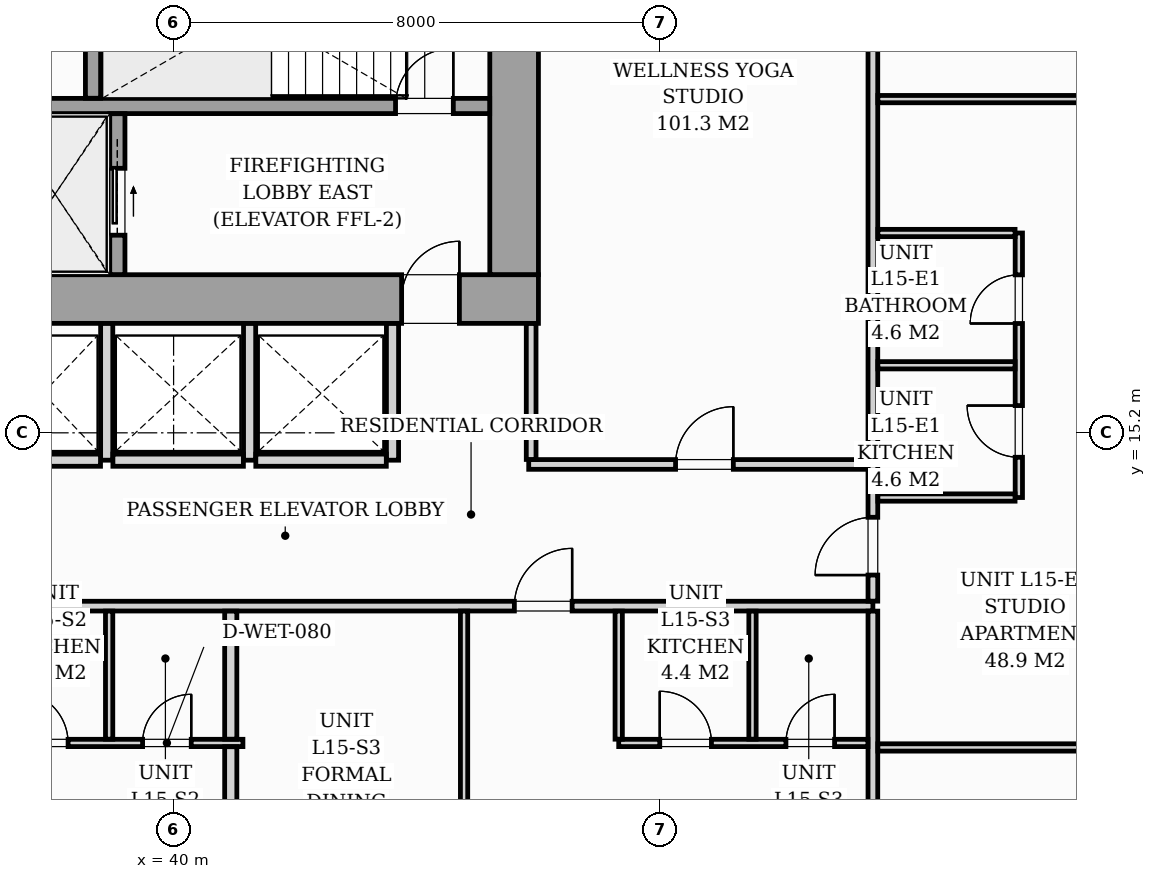
"""IFC4 building model, lengths in metres.
Left out: names, types, materials, properties, quantities, classifications, styles, units other than length and angle.
Written with IfcOpenShell. Run it as: python <this file> out.ifc"""

import sys

from ifc_helpers import new_model, si_unit, direction, frame, frame_2d, origin, origin_2d, place, context, subcontext, project, spatial, rectangle, i_section, extrude, source, transform, mapped, element, fill, save


model = new_model("IFC4")
c1 = context("Model", 3, precision=1e-05, world=origin(), true_north=direction((0.0, 1.0)))
c2 = subcontext(c1, "Body", "Model", "MODEL_VIEW")
j1 = project(units=[si_unit("LENGTHUNIT", "METRE"), si_unit("PLANEANGLEUNIT", "RADIAN")], contexts=[c1])
p1 = place(None, origin())
s1 = spatial("IfcSite", under=j1, at=p1, CompositionType="ELEMENT")
p2 = place(p1, origin())
s2 = spatial("IfcBuilding", under=s1, at=p2, CompositionType="ELEMENT")
p3 = place(p2, frame((0.0, 0.0, 55.0)))
s3 = spatial("IfcBuildingStorey", under=s2, at=p3, CompositionType="ELEMENT", Elevation=55.0)
m1 = source(origin(), c2, "Body", "SweptSolid", [
    extrude(i_section(OverallWidth=0.437, OverallDepth=0.514, WebThickness=0.061, FlangeThickness=0.097, FilletRadius=0.018, at=origin_2d()), origin(), (0.0, 0.0, 1.0), 3.196),
])
for number, where, z_axis, x_axis in (
    (1, (38.88, 17.4, 0.002), (0.0, 0.0, 1.0), (1.0, 0.0, 0.0)),
    (2, (45.6, 17.4, 0.002), (0.0, 0.0, 1.0), (1.0, 0.0, 0.0)),
):
    element("IfcColumn", number, at=place(p3, frame(where, z_axis=z_axis, x_axis=x_axis)), inside=s3, PredefinedType="PILASTER", context=c2, shape_type="MappedRepresentation", body=[
        mapped(m1, transform((0.0, 0.0, 0.0), scale=1.0)),
    ])
p4 = place(p3, frame((26.0, 17.4, 0.0), z_axis=(0.0, 0.0, 1.0), x_axis=(1.0, 0.0, 0.0)))
e3 = element("IfcWall", 3, at=p4, inside=s3, PredefinedType="SHEAR", context=c2, shape_type="SweptSolid", body=[
    extrude(rectangle(XDim=20.0, YDim=0.8, at=frame_2d((10.0, 0.0))), origin(), (0.0, 0.0, 1.0), 3.2),
])
p5 = place(p4, frame((1.15, 0.0, 0.0)))
e4 = element("IfcOpeningElement", 4, at=p5, cuts=e3, PredefinedType="OPENING", context=c2, shape_type="SweptSolid", body=[
    extrude(rectangle(XDim=0.95, YDim=2.06, at=frame_2d((0.475, 1.03))), frame((0.0, 0.41, 0.0), z_axis=(0.0, -1.0, 0.0), x_axis=(1.0, 0.0, 0.0)), (0.0, 0.0, 1.0), 0.82),
])
p6 = place(p4, frame((9.58, 0.0, 0.0)))
e5 = element("IfcOpeningElement", 5, at=p6, cuts=e3, PredefinedType="OPENING", context=c2, shape_type="SweptSolid", body=[
    extrude(rectangle(XDim=0.85, YDim=2.0, at=frame_2d((0.425, 1.0))), frame((0.0, 0.41, 0.0), z_axis=(0.0, -1.0, 0.0), x_axis=(1.0, 0.0, 0.0)), (0.0, 0.0, 1.0), 0.82),
])
p7 = place(p4, frame((17.75, 0.0, 0.0)))
e6 = element("IfcOpeningElement", 6, at=p7, cuts=e3, PredefinedType="OPENING", context=c2, shape_type="SweptSolid", body=[
    extrude(rectangle(XDim=0.95, YDim=2.06, at=frame_2d((0.475, 1.03))), frame((0.0, 0.41, 0.0), z_axis=(0.0, -1.0, 0.0), x_axis=(1.0, 0.0, 0.0)), (0.0, 0.0, 1.0), 0.82),
])
p8 = place(p3, frame((45.6, 17.802, 0.0), z_axis=(0.0, 0.0, 1.0), x_axis=(0.0, 1.0, 0.0)))
e7 = element("IfcWall", 7, at=p8, inside=s3, PredefinedType="SHEAR", context=c2, shape_type="SweptSolid", body=[
    extrude(rectangle(XDim=5.796, YDim=0.8, at=frame_2d((2.898, 0.0))), origin(), (0.0, 0.0, 1.0), 3.2),
])
p9 = place(p3, frame((37.05, 20.575, 0.0), z_axis=(0.0, 0.0, 1.0), x_axis=(1.0, 0.0, 0.0)))
e8 = element("IfcWall", 8, at=p9, inside=s3, PredefinedType="SOLIDWALL", context=c2, shape_type="SweptSolid", body=[
    extrude(rectangle(XDim=8.148, YDim=0.25, at=frame_2d((4.074, 0.0))), origin(), (0.0, 0.0, 1.0), 3.2),
])
p10 = place(p9, frame((6.6, 0.0, 0.0)))
e9 = element("IfcOpeningElement", 9, at=p10, cuts=e8, PredefinedType="OPENING", context=c2, shape_type="SweptSolid", body=[
    extrude(rectangle(XDim=0.95, YDim=2.06, at=frame_2d((0.475, 1.03))), frame((0.0, 0.135, 0.0), z_axis=(0.0, -1.0, 0.0), x_axis=(1.0, 0.0, 0.0)), (0.0, 0.0, 1.0), 0.27),
])
p11 = place(p3, frame((38.675, 20.702, 0.0), z_axis=(0.0, 0.0, 1.0), x_axis=(0.0, 1.0, 0.0)))
e10 = element("IfcWall", 10, at=p11, inside=s3, PredefinedType="SOLIDWALL", context=c2, shape_type="SweptSolid", body=[
    extrude(rectangle(XDim=2.896, YDim=0.25, at=frame_2d((1.448, 0.0))), origin(), (0.0, 0.0, 1.0), 3.2),
])
p12 = place(p3, frame((39.075, 17.802, 0.0), z_axis=(0.0, 0.0, 1.0), x_axis=(0.0, 1.0, 0.0)))
e11 = element("IfcWall", 11, at=p12, inside=s3, PredefinedType="SOLIDWALL", context=c2, shape_type="SweptSolid", body=[
    extrude(rectangle(XDim=2.646, YDim=0.25, at=frame_2d((1.323, 0.0))), origin(), (0.0, 0.0, 1.0), 3.2),
])
p13 = place(p12, frame((0.648, 0.0, 0.0)))
e12 = element("IfcOpeningElement", 12, at=p13, cuts=e11, PredefinedType="OPENING", context=c2, shape_type="SweptSolid", body=[
    extrude(rectangle(XDim=1.1, YDim=2.08, at=frame_2d((0.55, 1.04))), frame((0.0, 0.135, 0.0), z_axis=(0.0, -1.0, 0.0), x_axis=(1.0, 0.0, 0.0)), (0.0, 0.0, 1.0), 0.27),
])
p14 = place(p3, frame((38.9, 14.75, 0.0), z_axis=(0.0, 0.0, 1.0), x_axis=(0.0, 1.0, 0.0)))
e13 = element("IfcWall", 13, at=p14, inside=s3, PredefinedType="PARTITIONING", context=c2, shape_type="SweptSolid", body=[
    extrude(rectangle(XDim=2.248, YDim=0.2, at=frame_2d((1.124, 0.0))), origin(), (0.0, 0.0, 1.0), 2.94),
])
p15 = place(p3, frame((36.902, 14.75, 0.0), z_axis=(0.0, 0.0, 1.0), x_axis=(1.0, 0.0, 0.0)))
e14 = element("IfcWall", 14, at=p15, inside=s3, PredefinedType="PARTITIONING", context=c2, shape_type="SweptSolid", body=[
    extrude(rectangle(XDim=1.896, YDim=0.2, at=frame_2d((0.948, 0.0))), origin(), (0.0, 0.0, 1.0), 2.94),
])
for number, where, z_axis, x_axis in (
    (15, (41.25, 14.75, 0.0), (0.0, 0.0, 1.0), (0.0, 1.0, 0.0)),
    (16, (43.6, 14.75, 0.0), (0.0, 0.0, 1.0), (0.0, 1.0, 0.0)),
):
    element("IfcWall", number, at=place(p3, frame(where, z_axis=z_axis, x_axis=x_axis)), inside=s3, PredefinedType="PARTITIONING", context=c2, shape_type="SweptSolid", body=[
        extrude(rectangle(XDim=2.248, YDim=0.2, at=frame_2d((1.124, 0.0))), origin(), (0.0, 0.0, 1.0), 2.94),
    ])
for number, where, z_axis, x_axis in (
    (17, (39.002, 14.75, 0.0), (0.0, 0.0, 1.0), (1.0, 0.0, 0.0)),
    (18, (41.352, 14.75, 0.0), (0.0, 0.0, 1.0), (1.0, 0.0, 0.0)),
):
    element("IfcWall", number, at=place(p3, frame(where, z_axis=z_axis, x_axis=x_axis)), inside=s3, PredefinedType="PARTITIONING", context=c2, shape_type="SweptSolid", body=[
        extrude(rectangle(XDim=2.146, YDim=0.2, at=frame_2d((1.073, 0.0))), origin(), (0.0, 0.0, 1.0), 2.94),
    ])
p16 = place(p3, frame((16.3, 12.35, 0.0), z_axis=(0.0, 0.0, 1.0), x_axis=(1.0, 0.0, 0.0)))
e19 = element("IfcWall", 19, at=p16, inside=s3, PredefinedType="PARTITIONING", context=c2, shape_type="SweptSolid", body=[
    extrude(rectangle(XDim=35.2, YDim=0.16, at=frame_2d((17.6, 0.0))), origin(), (0.0, 0.0, 1.0), 2.94),
])
p17 = place(p16, frame((6.307, 0.0, 0.0)))
e20 = element("IfcOpeningElement", 20, at=p17, cuts=e19, PredefinedType="OPENING", context=c2, shape_type="SweptSolid", body=[
    extrude(rectangle(XDim=0.95, YDim=2.06, at=frame_2d((0.475, 1.03))), frame((0.0, 0.09, 0.0), z_axis=(0.0, -1.0, 0.0), x_axis=(1.0, 0.0, 0.0)), (0.0, 0.0, 1.0), 0.18),
])
p18 = place(p16, frame((18.392, 0.0, 0.0)))
e21 = element("IfcOpeningElement", 21, at=p18, cuts=e19, PredefinedType="OPENING", context=c2, shape_type="SweptSolid", body=[
    extrude(rectangle(XDim=0.95, YDim=2.06, at=frame_2d((0.475, 1.03))), frame((0.0, 0.09, 0.0), z_axis=(0.0, -1.0, 0.0), x_axis=(1.0, 0.0, 0.0)), (0.0, 0.0, 1.0), 0.18),
])
p19 = place(p16, frame((29.304, 0.0, 0.0)))
e22 = element("IfcOpeningElement", 22, at=p19, cuts=e19, PredefinedType="OPENING", context=c2, shape_type="SweptSolid", body=[
    extrude(rectangle(XDim=0.95, YDim=2.06, at=frame_2d((0.475, 1.03))), frame((0.0, 0.09, 0.0), z_axis=(0.0, -1.0, 0.0), x_axis=(1.0, 0.0, 0.0)), (0.0, 0.0, 1.0), 0.18),
])
p20 = place(p3, frame((51.5, 2.962, 0.0), z_axis=(0.0, 0.0, 1.0), x_axis=(0.0, 1.0, 0.0)))
e23 = element("IfcWall", 23, at=p20, inside=s3, PredefinedType="PARTITIONING", context=c2, shape_type="SweptSolid", body=[
    extrude(rectangle(XDim=9.306, YDim=0.16, at=frame_2d((4.653, 0.0))), origin(), (0.0, 0.0, 1.0), 2.94),
])
p21 = place(p3, frame((51.5, 12.432, 0.0), z_axis=(0.0, 0.0, 1.0), x_axis=(0.0, 1.0, 0.0)))
e24 = element("IfcWall", 24, at=p21, inside=s3, PredefinedType="PARTITIONING", context=c2, shape_type="SweptSolid", body=[
    extrude(rectangle(XDim=15.006, YDim=0.16, at=frame_2d((7.503, 0.0))), origin(), (0.0, 0.0, 1.0), 2.94),
])
p22 = place(p21, frame((0.429, 0.0, 0.0)))
e25 = element("IfcOpeningElement", 25, at=p22, cuts=e24, PredefinedType="OPENING", context=c2, shape_type="SweptSolid", body=[
    extrude(rectangle(XDim=0.95, YDim=2.06, at=frame_2d((0.475, 1.03))), frame((0.0, 0.09, 0.0), z_axis=(0.0, -1.0, 0.0), x_axis=(1.0, 0.0, 0.0)), (0.0, 0.0, 1.0), 0.18),
])
p23 = place(p3, frame((36.74, 10.1, 0.0), z_axis=(0.0, 0.0, 1.0), x_axis=(1.0, 0.0, 0.0)))
e26 = element("IfcWall", 26, at=p23, inside=s3, PredefinedType="PARTITIONING", context=c2, shape_type="SweptSolid", body=[
    extrude(rectangle(XDim=4.4, YDim=0.12, at=frame_2d((2.2, 0.0))), origin(), (0.0, 0.0, 1.0), 2.94),
])
p24 = place(p23, frame((0.675, 0.0, 0.0)))
e27 = element("IfcOpeningElement", 27, at=p24, cuts=e26, PredefinedType="OPENING", context=c2, shape_type="SweptSolid", body=[
    extrude(rectangle(XDim=0.85, YDim=2.05, at=frame_2d((0.425, 1.025))), frame((0.0, 0.07, 0.0), z_axis=(0.0, -1.0, 0.0), x_axis=(1.0, 0.0, 0.0)), (0.0, 0.0, 1.0), 0.14),
])
p25 = place(p23, frame((2.75, 0.0, 0.0)))
e28 = element("IfcOpeningElement", 28, at=p25, cuts=e26, PredefinedType="OPENING", context=c2, shape_type="SweptSolid", body=[
    extrude(rectangle(XDim=0.8, YDim=2.02, at=frame_2d((0.4, 1.01))), frame((0.0, 0.07, 0.0), z_axis=(0.0, -1.0, 0.0), x_axis=(1.0, 0.0, 0.0)), (0.0, 0.0, 1.0), 0.14),
])
p26 = place(p3, frame((38.94, 10.162, 0.0), z_axis=(0.0, 0.0, 1.0), x_axis=(0.0, 1.0, 0.0)))
e29 = element("IfcWall", 29, at=p26, inside=s3, PredefinedType="PARTITIONING", context=c2, shape_type="SweptSolid", body=[
    extrude(rectangle(XDim=2.106, YDim=0.12, at=frame_2d((1.053, 0.0))), origin(), (0.0, 0.0, 1.0), 2.94),
])
p27 = place(p3, frame((40.94, 2.962, 0.0), z_axis=(0.0, 0.0, 1.0), x_axis=(0.0, 1.0, 0.0)))
e30 = element("IfcWall", 30, at=p27, inside=s3, PredefinedType="PARTITIONING", context=c2, shape_type="SweptSolid", body=[
    extrude(rectangle(XDim=7.076, YDim=0.2, at=frame_2d((3.538, 0.0))), origin(), (0.0, 0.0, 1.0), 2.94),
])
p28 = place(p3, frame((40.94, 10.162, 0.0), z_axis=(0.0, 0.0, 1.0), x_axis=(0.0, 1.0, 0.0)))
e31 = element("IfcWall", 31, at=p28, inside=s3, PredefinedType="PARTITIONING", context=c2, shape_type="SweptSolid", body=[
    extrude(rectangle(XDim=2.106, YDim=0.2, at=frame_2d((1.053, 0.0))), origin(), (0.0, 0.0, 1.0), 2.94),
])
p29 = place(p3, frame((47.32, 10.1, 0.0), z_axis=(0.0, 0.0, 1.0), x_axis=(1.0, 0.0, 0.0)))
e32 = element("IfcWall", 32, at=p29, inside=s3, PredefinedType="PARTITIONING", context=c2, shape_type="SweptSolid", body=[
    extrude(rectangle(XDim=4.098, YDim=0.12, at=frame_2d((2.049, 0.0))), origin(), (0.0, 0.0, 1.0), 2.94),
])
p30 = place(p29, frame((0.675, 0.0, 0.0)))
e33 = element("IfcOpeningElement", 33, at=p30, cuts=e32, PredefinedType="OPENING", context=c2, shape_type="SweptSolid", body=[
    extrude(rectangle(XDim=0.85, YDim=2.05, at=frame_2d((0.425, 1.025))), frame((0.0, 0.07, 0.0), z_axis=(0.0, -1.0, 0.0), x_axis=(1.0, 0.0, 0.0)), (0.0, 0.0, 1.0), 0.14),
])
p31 = place(p29, frame((2.75, 0.0, 0.0)))
e34 = element("IfcOpeningElement", 34, at=p31, cuts=e32, PredefinedType="OPENING", context=c2, shape_type="SweptSolid", body=[
    extrude(rectangle(XDim=0.8, YDim=2.02, at=frame_2d((0.4, 1.01))), frame((0.0, 0.07, 0.0), z_axis=(0.0, -1.0, 0.0), x_axis=(1.0, 0.0, 0.0)), (0.0, 0.0, 1.0), 0.14),
])
for number, where, z_axis, x_axis in (
    (35, (47.32, 10.162, 0.0), (0.0, 0.0, 1.0), (0.0, 1.0, 0.0)),
    (36, (49.52, 10.162, 0.0), (0.0, 0.0, 1.0), (0.0, 1.0, 0.0)),
):
    element("IfcWall", number, at=place(p3, frame(where, z_axis=z_axis, x_axis=x_axis)), inside=s3, PredefinedType="PARTITIONING", context=c2, shape_type="SweptSolid", body=[
        extrude(rectangle(XDim=2.106, YDim=0.12, at=frame_2d((1.053, 0.0))), origin(), (0.0, 0.0, 1.0), 2.94),
    ])
p32 = place(p3, frame((44.777, 2.962, 0.0), z_axis=(0.0, 0.0, 1.0), x_axis=(0.0, 1.0, 0.0)))
e37 = element("IfcWall", 37, at=p32, inside=s3, PredefinedType="PARTITIONING", context=c2, shape_type="SweptSolid", body=[
    extrude(rectangle(XDim=9.306, YDim=0.12, at=frame_2d((4.653, 0.0))), origin(), (0.0, 0.0, 1.0), 2.136),
])
p33 = place(p32, frame((4.218, 0.0, 0.0)))
e38 = element("IfcOpeningElement", 38, at=p33, cuts=e37, PredefinedType="OPENING", context=c2, shape_type="SweptSolid", body=[
    extrude(rectangle(XDim=0.85, YDim=2.01, at=frame_2d((0.425, 1.005))), frame((0.0, 0.07, 0.0), z_axis=(0.0, -1.0, 0.0), x_axis=(1.0, 0.0, 0.0)), (0.0, 0.0, 1.0), 0.14),
])
p34 = place(p3, frame((53.9, 14.136, 0.0), z_axis=(0.0, 0.0, 1.0), x_axis=(0.0, 1.0, 0.0)))
e39 = element("IfcWall", 39, at=p34, inside=s3, PredefinedType="PARTITIONING", context=c2, shape_type="SweptSolid", body=[
    extrude(rectangle(XDim=4.35, YDim=0.12, at=frame_2d((2.175, 0.0))), origin(), (0.0, 0.0, 1.0), 2.94),
])
p35 = place(p34, frame((0.662, 0.0, 0.0)))
e40 = element("IfcOpeningElement", 40, at=p35, cuts=e39, PredefinedType="OPENING", context=c2, shape_type="SweptSolid", body=[
    extrude(rectangle(XDim=0.85, YDim=2.05, at=frame_2d((0.425, 1.025))), frame((0.0, 0.07, 0.0), z_axis=(0.0, -1.0, 0.0), x_axis=(1.0, 0.0, 0.0)), (0.0, 0.0, 1.0), 0.14),
])
p36 = place(p34, frame((2.862, 0.0, 0.0)))
e41 = element("IfcOpeningElement", 41, at=p36, cuts=e39, PredefinedType="OPENING", context=c2, shape_type="SweptSolid", body=[
    extrude(rectangle(XDim=0.8, YDim=2.02, at=frame_2d((0.4, 1.01))), frame((0.0, 0.07, 0.0), z_axis=(0.0, -1.0, 0.0), x_axis=(1.0, 0.0, 0.0)), (0.0, 0.0, 1.0), 0.14),
])
p37 = place(p3, frame((51.582, 16.311, 0.0), z_axis=(0.0, 0.0, 1.0), x_axis=(1.0, 0.0, 0.0)))
e42 = element("IfcWall", 42, at=p37, inside=s3, PredefinedType="PARTITIONING", context=c2, shape_type="SweptSolid", body=[
    extrude(rectangle(XDim=2.256, YDim=0.12, at=frame_2d((1.128, 0.0))), origin(), (0.0, 0.0, 1.0), 2.045),
])
for number, where, z_axis, x_axis in (
    (43, (51.582, 14.136, 0.0), (0.0, 0.0, 1.0), (1.0, 0.0, 0.0)),
    (44, (51.582, 18.486, 0.0), (0.0, 0.0, 1.0), (1.0, 0.0, 0.0)),
):
    element("IfcWall", number, at=place(p3, frame(where, z_axis=z_axis, x_axis=x_axis)), inside=s3, PredefinedType="PARTITIONING", context=c2, shape_type="SweptSolid", body=[
        extrude(rectangle(XDim=2.256, YDim=0.12, at=frame_2d((1.128, 0.0))), origin(), (0.0, 0.0, 1.0), 2.94),
    ])
p38 = place(p3, frame((51.582, 10.026, 0.0), z_axis=(0.0, 0.0, 1.0), x_axis=(1.0, 0.0, 0.0)))
e45 = element("IfcWall", 45, at=p38, inside=s3, PredefinedType="PARTITIONING", context=c2, shape_type="SweptSolid", body=[
    extrude(rectangle(XDim=8.138, YDim=0.12, at=frame_2d((4.069, 0.0))), origin(), (0.0, 0.0, 1.0), 2.94),
])
p39 = place(p38, frame((3.653, 0.0, 0.0)))
e46 = element("IfcOpeningElement", 46, at=p39, cuts=e45, PredefinedType="OPENING", context=c2, shape_type="SweptSolid", body=[
    extrude(rectangle(XDim=0.85, YDim=2.05, at=frame_2d((0.425, 1.025))), frame((0.0, 0.07, 0.0), z_axis=(0.0, -1.0, 0.0), x_axis=(1.0, 0.0, 0.0)), (0.0, 0.0, 1.0), 0.14),
])
p40 = place(p3, frame((51.582, 20.688, 0.0), z_axis=(0.0, 0.0, 1.0), x_axis=(1.0, 0.0, 0.0)))
e47 = element("IfcWall", 47, at=p40, inside=s3, PredefinedType="PARTITIONING", context=c2, shape_type="SweptSolid", body=[
    extrude(rectangle(XDim=8.138, YDim=0.12, at=frame_2d((4.069, 0.0))), origin(), (0.0, 0.0, 1.0), 2.94),
])
p41 = place(p40, frame((3.653, 0.0, 0.0)))
e48 = element("IfcOpeningElement", 48, at=p41, cuts=e47, PredefinedType="OPENING", context=c2, shape_type="SweptSolid", body=[
    extrude(rectangle(XDim=0.85, YDim=2.05, at=frame_2d((0.425, 1.025))), frame((0.0, 0.07, 0.0), z_axis=(0.0, -1.0, 0.0), x_axis=(1.0, 0.0, 0.0)), (0.0, 0.0, 1.0), 0.14),
])
p42 = place(p3, frame((45.84, 14.68, 0.0), z_axis=(0.0, 0.0, 1.0), x_axis=(1.0, 0.0, 0.0)))
e49 = element("IfcWall", 49, at=p42, inside=s3, PredefinedType="PARTITIONING", context=c2, shape_type="SweptSolid", body=[
    extrude(rectangle(XDim=5.578, YDim=0.16, at=frame_2d((2.789, 0.0))), origin(), (0.0, 0.0, 1.0), 2.94),
])
p43 = place(p42, frame((2.415, 0.0, 0.0)))
e50 = element("IfcOpeningElement", 50, at=p43, cuts=e49, PredefinedType="OPENING", context=c2, shape_type="SweptSolid", body=[
    extrude(rectangle(XDim=0.95, YDim=2.06, at=frame_2d((0.475, 1.03))), frame((0.0, 0.09, 0.0), z_axis=(0.0, -1.0, 0.0), x_axis=(1.0, 0.0, 0.0)), (0.0, 0.0, 1.0), 0.18),
])
p44 = place(p3, frame((45.88, 14.762, 0.0), z_axis=(0.0, 0.0, 1.0), x_axis=(0.0, 1.0, 0.0)))
e51 = element("IfcWall", 51, at=p44, inside=s3, PredefinedType="PARTITIONING", context=c2, shape_type="SweptSolid", body=[
    extrude(rectangle(XDim=2.236, YDim=0.16, at=frame_2d((1.118, 0.0))), origin(), (0.0, 0.0, 1.0), 2.94),
])
m2 = source(origin(), c2, "Body", "SweptSolid", [
    extrude(rectangle(XDim=0.95, YDim=2.06, at=frame_2d((0.475, 1.03))), frame((0.0, 0.025, 0.0), z_axis=(0.0, -1.0, 0.0), x_axis=(1.0, 0.0, 0.0)), (0.0, 0.0, 1.0), 0.05),
])
p45 = place(p7, origin())
e52 = element("IfcDoor", 52, at=p45, inside=s3, OperationType="SINGLE_SWING_RIGHT", PredefinedType="DOOR", context=c2, shape_type="MappedRepresentation", body=[
    mapped(m2, transform((0.0, 0.0, 0.0), scale=1.0)),
])
fill(e6, e52)
p46 = place(p10, origin())
e53 = element("IfcDoor", 53, at=p46, inside=s3, OperationType="SINGLE_SWING_RIGHT", PredefinedType="DOOR", context=c2, shape_type="MappedRepresentation", body=[
    mapped(m2, transform((0.0, 0.0, 0.0), scale=1.0)),
])
fill(e9, e53)
m3 = source(origin(), c2, "Body", "SweptSolid", [
    extrude(rectangle(XDim=1.1, YDim=2.08, at=frame_2d((0.55, 1.04))), frame((0.0, 0.025, 0.0), z_axis=(0.0, -1.0, 0.0), x_axis=(1.0, 0.0, 0.0)), (0.0, 0.0, 1.0), 0.05),
])
p47 = place(p13, origin())
e54 = element("IfcDoor", 54, at=p47, inside=s3, OperationType="SLIDING_TO_RIGHT", PredefinedType="DOOR", context=c2, shape_type="MappedRepresentation", body=[
    mapped(m3, transform((0.0, 0.0, 0.0), scale=1.0)),
])
fill(e12, e54)
m4 = source(origin(), c2, "Body", "SweptSolid", [
    extrude(rectangle(XDim=0.85, YDim=2.05, at=frame_2d((0.425, 1.025))), frame((0.0, 0.025, 0.0), z_axis=(0.0, -1.0, 0.0), x_axis=(1.0, 0.0, 0.0)), (0.0, 0.0, 1.0), 0.05),
])
p48 = place(p24, origin())
e55 = element("IfcDoor", 55, at=p48, inside=s3, OperationType="SINGLE_SWING_LEFT", PredefinedType="DOOR", context=c2, shape_type="MappedRepresentation", body=[
    mapped(m4, transform((0.0, 0.0, 0.0), scale=1.0)),
])
fill(e27, e55)
m5 = source(origin(), c2, "Body", "SweptSolid", [
    extrude(rectangle(XDim=0.8, YDim=2.02, at=frame_2d((0.4, 1.01))), frame((0.0, 0.025, 0.0), z_axis=(0.0, -1.0, 0.0), x_axis=(1.0, 0.0, 0.0)), (0.0, 0.0, 1.0), 0.05),
])
p49 = place(p25, origin())
e56 = element("IfcDoor", 56, at=p49, inside=s3, OperationType="SINGLE_SWING_RIGHT", PredefinedType="DOOR", context=c2, shape_type="MappedRepresentation", body=[
    mapped(m5, transform((0.0, 0.0, 0.0), scale=1.0)),
])
fill(e28, e56)
m6 = source(origin(), c2, "Body", "SweptSolid", [
    extrude(rectangle(XDim=0.95, YDim=2.06, at=frame_2d((0.475, 1.03))), frame((0.0, 0.025, 0.0), z_axis=(0.0, -1.0, 0.0), x_axis=(1.0, 0.0, 0.0)), (0.0, 0.0, 1.0), 0.05),
])
p50 = place(p19, origin())
e57 = element("IfcDoor", 57, at=p50, inside=s3, OperationType="SINGLE_SWING_RIGHT", PredefinedType="DOOR", context=c2, shape_type="MappedRepresentation", body=[
    mapped(m6, transform((0.0, 0.0, 0.0), scale=1.0)),
])
fill(e22, e57)
p51 = place(p30, origin())
e58 = element("IfcDoor", 58, at=p51, inside=s3, OperationType="SINGLE_SWING_LEFT", PredefinedType="DOOR", context=c2, shape_type="MappedRepresentation", body=[
    mapped(m4, transform((0.0, 0.0, 0.0), scale=1.0)),
])
fill(e33, e58)
p52 = place(p31, origin())
e59 = element("IfcDoor", 59, at=p52, inside=s3, OperationType="SINGLE_SWING_RIGHT", PredefinedType="DOOR", context=c2, shape_type="MappedRepresentation", body=[
    mapped(m5, transform((0.0, 0.0, 0.0), scale=1.0)),
])
fill(e34, e59)
p53 = place(p22, origin())
e60 = element("IfcDoor", 60, at=p53, inside=s3, OperationType="SINGLE_SWING_LEFT", PredefinedType="DOOR", context=c2, shape_type="MappedRepresentation", body=[
    mapped(m6, transform((0.0, 0.0, 0.0), scale=1.0)),
])
fill(e25, e60)
p54 = place(p35, origin())
e61 = element("IfcDoor", 61, at=p54, inside=s3, OperationType="SINGLE_SWING_RIGHT", PredefinedType="DOOR", context=c2, shape_type="MappedRepresentation", body=[
    mapped(m4, transform((0.0, 0.0, 0.0), scale=1.0)),
])
fill(e40, e61)
p55 = place(p36, origin())
e62 = element("IfcDoor", 62, at=p55, inside=s3, OperationType="SINGLE_SWING_LEFT", PredefinedType="DOOR", context=c2, shape_type="MappedRepresentation", body=[
    mapped(m5, transform((0.0, 0.0, 0.0), scale=1.0)),
])
fill(e41, e62)
p56 = place(p43, origin())
e63 = element("IfcDoor", 63, at=p56, inside=s3, OperationType="SINGLE_SWING_RIGHT", PredefinedType="DOOR", context=c2, shape_type="MappedRepresentation", body=[
    mapped(m6, transform((0.0, 0.0, 0.0), scale=1.0)),
])
fill(e50, e63)
save(model, sys.argv[1])
